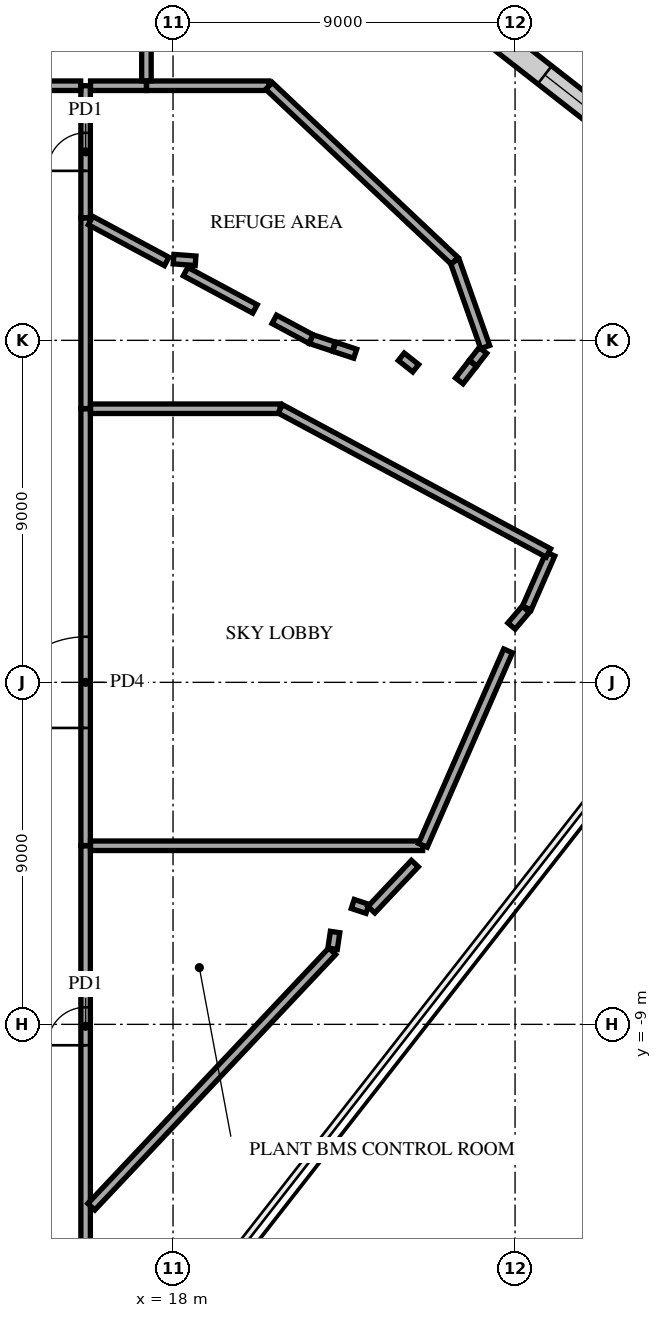
"""IFC4 building model, lengths in metres.
Left out: names, types, materials, properties, quantities, classifications, styles, units other than length and angle.
Written with IfcOpenShell. Run it as: python <this file> out.ifc"""

import sys

from ifc_helpers import new_model, si_unit, direction, frame, frame_2d, origin, place, context, subcontext, project, spatial, rectangle, extrude, element, fill, save


model = new_model("IFC4")
c1 = context("Model", 3, precision=1e-05, world=origin(), true_north=direction((0.0, 1.0)))
c2 = subcontext(c1, "Body", "Model", "MODEL_VIEW")
j1 = project(units=[si_unit("LENGTHUNIT", "METRE"), si_unit("PLANEANGLEUNIT", "RADIAN")], contexts=[c1])
p1 = place(None, origin())
s1 = spatial("IfcSite", under=j1, at=p1, CompositionType="ELEMENT")
p2 = place(p1, origin())
s2 = spatial("IfcBuilding", under=s1, at=p2, CompositionType="ELEMENT")
p3 = place(p2, frame((0.0, 0.0, 237.3)))
s3 = spatial("IfcBuildingStorey", under=s2, at=p3, CompositionType="ELEMENT", Elevation=237.3)
p4 = place(p3, frame((15.7, -15.7, 0.0), z_axis=(0.0, 0.0, 1.0), x_axis=(0.0, 1.0, 0.0)))
e1 = element("IfcWall", 1, at=p4, inside=s3, PredefinedType="PARTITIONING", context=c2, shape_type="SweptSolid", body=[
    extrude(rectangle(XDim=11.4, YDim=0.25, at=frame_2d((5.7, 0.0))), origin(), (0.0, 0.0, 1.0), 4.406),
])
p5 = place(p4, frame((6.15, 0.0, 0.0)))
e2 = element("IfcOpeningElement", 2, at=p5, cuts=e1, PredefinedType="OPENING", context=c2, shape_type="SweptSolid", body=[
    extrude(rectangle(XDim=1.0, YDim=2.1, at=frame_2d((0.5, 1.05))), frame((0.0, 0.135, 0.0), z_axis=(0.0, -1.0, 0.0), x_axis=(1.0, 0.0, 0.0)), (0.0, 0.0, 1.0), 0.27),
])
p6 = place(p3, frame((15.851, -13.8, 0.0), z_axis=(0.0, 0.0, 1.0), x_axis=(0.685913359508, 0.727683216275, 0.0)))
e3 = element("IfcWall", 3, at=p6, inside=s3, PredefinedType="PARTITIONING", context=c2, shape_type="SweptSolid", body=[
    extrude(rectangle(XDim=9.241, YDim=0.25, at=frame_2d((4.62, 0.0))), origin(), (0.0, 0.0, 1.0), 4.406),
])
p7 = place(p3, frame((22.199, -7.01, 0.0), z_axis=(0.0, 0.0, 1.0), x_axis=(0.146409547937, 0.989224061714, 0.0)))
e4 = element("IfcWall", 4, at=p7, inside=s3, PredefinedType="PARTITIONING", context=c2, shape_type="SweptSolid", body=[
    extrude(rectangle(XDim=0.445, YDim=0.25, at=frame_2d((0.223, 0.0))), origin(), (0.0, 0.0, 1.0), 5.24),
])
p8 = place(p3, frame((22.729, -5.832, 0.0), z_axis=(0.0, 0.0, 1.0), x_axis=(0.949400086722, -0.314069220607, 0.0)))
e5 = element("IfcWall", 5, at=p8, inside=s3, PredefinedType="PARTITIONING", context=c2, shape_type="SweptSolid", body=[
    extrude(rectangle(XDim=0.407, YDim=0.25, at=frame_2d((0.204, 0.0))), origin(), (0.0, 0.0, 1.0), 5.24),
])
p9 = place(p3, frame((23.219, -5.983, 0.0), z_axis=(0.0, 0.0, 1.0), x_axis=(0.685939801415, 0.727658291257, 0.0)))
e6 = element("IfcWall", 6, at=p9, inside=s3, PredefinedType="PARTITIONING", context=c2, shape_type="SweptSolid", body=[
    extrude(rectangle(XDim=1.668, YDim=0.25, at=frame_2d((0.834, 0.0))), origin(), (0.0, 0.0, 1.0), 5.24),
])
p10 = place(p3, frame((15.7, -4.295, 0.0), z_axis=(0.0, 0.0, 1.0), x_axis=(0.0, 1.0, 0.0)))
e7 = element("IfcWall", 7, at=p10, inside=s3, PredefinedType="PARTITIONING", context=c2, shape_type="SweptSolid", body=[
    extrude(rectangle(XDim=11.495, YDim=0.25, at=frame_2d((5.748, 0.0))), origin(), (0.0, 0.0, 1.0), 4.72),
])
p11 = place(p10, frame((3.095, 0.0, 0.0)))
e8 = element("IfcOpeningElement", 8, at=p11, cuts=e7, PredefinedType="OPENING", context=c2, shape_type="SweptSolid", body=[
    extrude(rectangle(XDim=2.4, YDim=2.4, at=frame_2d((1.2, 1.2))), frame((0.0, 0.135, 0.0), z_axis=(0.0, -1.0, 0.0), x_axis=(1.0, 0.0, 0.0)), (0.0, 0.0, 1.0), 0.27),
])
p12 = place(p3, frame((15.83, -4.3, 0.0), z_axis=(0.0, 0.0, 1.0), x_axis=(1.0, 0.0, 0.0)))
e9 = element("IfcWall", 9, at=p12, inside=s3, PredefinedType="PARTITIONING", context=c2, shape_type="SweptSolid", body=[
    extrude(rectangle(XDim=8.739, YDim=0.25, at=frame_2d((4.369, 0.0))), origin(), (0.0, 0.0, 1.0), 4.406),
])
p13 = place(p3, frame((24.574, -4.289, 0.0), z_axis=(0.0, 0.0, 1.0), x_axis=(0.401222280586, 0.915980721173, 0.0)))
e10 = element("IfcWall", 10, at=p13, inside=s3, PredefinedType="PARTITIONING", context=c2, shape_type="SweptSolid", body=[
    extrude(rectangle(XDim=5.587, YDim=0.25, at=frame_2d((2.793, 0.0))), origin(), (0.0, 0.0, 1.0), 5.24),
])
p14 = place(p3, frame((26.907, 1.482, 0.0), z_axis=(0.0, 0.0, 1.0), x_axis=(0.647014435149, 0.76247775096, 0.0)))
e11 = element("IfcWall", 11, at=p14, inside=s3, PredefinedType="PARTITIONING", context=c2, shape_type="SweptSolid", body=[
    extrude(rectangle(XDim=0.582, YDim=0.25, at=frame_2d((0.291, 0.0))), origin(), (0.0, 0.0, 1.0), 5.24),
])
p15 = place(p3, frame((27.309, 1.956, 0.0), z_axis=(0.0, 0.0, 1.0), x_axis=(0.401091430505, 0.916038025617, 0.0)))
e12 = element("IfcWall", 12, at=p15, inside=s3, PredefinedType="PARTITIONING", context=c2, shape_type="SweptSolid", body=[
    extrude(rectangle(XDim=1.55, YDim=0.25, at=frame_2d((0.775, 0.0))), origin(), (0.0, 0.0, 1.0), 5.24),
])
p16 = place(p3, frame((15.7, 7.205, 0.0), z_axis=(0.0, 0.0, 1.0), x_axis=(0.0, 1.0, 0.0)))
e13 = element("IfcWall", 13, at=p16, inside=s3, PredefinedType="PARTITIONING", context=c2, shape_type="SweptSolid", body=[
    extrude(rectangle(XDim=5.017, YDim=0.25, at=frame_2d((2.509, 0.0))), origin(), (0.0, 0.0, 1.0), 4.72),
])
p17 = place(p3, frame((15.83, 7.2, 0.0), z_axis=(0.0, 0.0, 1.0), x_axis=(1.0, 0.0, 0.0)))
e14 = element("IfcWall", 14, at=p17, inside=s3, PredefinedType="PARTITIONING", context=c2, shape_type="SweptSolid", body=[
    extrude(rectangle(XDim=4.988, YDim=0.25, at=frame_2d((2.494, 0.0))), origin(), (0.0, 0.0, 1.0), 5.24),
])
p18 = place(p3, frame((20.823, 7.197, 0.0), z_axis=(0.0, 0.0, 1.0), x_axis=(0.880765589634, -0.473552506188, 0.0)))
e15 = element("IfcWall", 15, at=p18, inside=s3, PredefinedType="PARTITIONING", context=c2, shape_type="SweptSolid", body=[
    extrude(rectangle(XDim=8.008, YDim=0.25, at=frame_2d((4.004, 0.0))), origin(), (0.0, 0.0, 1.0), 4.406),
])
p19 = place(p3, frame((24.006, 8.567, 0.0), z_axis=(0.0, 0.0, 1.0), x_axis=(0.783912744573, -0.620871008258, 0.0)))
e16 = element("IfcWall", 16, at=p19, inside=s3, PredefinedType="PARTITIONING", context=c2, shape_type="SweptSolid", body=[
    extrude(rectangle(XDim=0.484, YDim=0.25, at=frame_2d((0.242, 0.0))), origin(), (0.0, 0.0, 1.0), 5.24),
])
p20 = place(p3, frame((25.533, 7.933, 0.0), z_axis=(0.0, 0.0, 1.0), x_axis=(0.612689720082, 0.790323545712, 0.0)))
e17 = element("IfcWall", 17, at=p20, inside=s3, PredefinedType="PARTITIONING", context=c2, shape_type="SweptSolid", body=[
    extrude(rectangle(XDim=0.581, YDim=0.25, at=frame_2d((0.291, 0.0))), origin(), (0.0, 0.0, 1.0), 5.24),
])
p21 = place(p3, frame((22.242, 8.831, 0.0), z_axis=(0.0, 0.0, 1.0), x_axis=(0.949269442188, -0.314463870942, 0.0)))
e18 = element("IfcWall", 18, at=p21, inside=s3, PredefinedType="PARTITIONING", context=c2, shape_type="SweptSolid", body=[
    extrude(rectangle(XDim=0.582, YDim=0.25, at=frame_2d((0.291, 0.0))), origin(), (0.0, 0.0, 1.0), 5.24),
])
p22 = place(p3, frame((25.898, 8.404, 0.0), z_axis=(0.0, 0.0, 1.0), x_axis=(0.612734781525, 0.790288610262, 0.0)))
e19 = element("IfcWall", 19, at=p22, inside=s3, PredefinedType="PARTITIONING", context=c2, shape_type="SweptSolid", body=[
    extrude(rectangle(XDim=0.421, YDim=0.25, at=frame_2d((0.21, 0.0))), origin(), (0.0, 0.0, 1.0), 5.24),
])
p23 = place(p3, frame((21.634, 9.032, 0.0), z_axis=(0.0, 0.0, 1.0), x_axis=(0.949265485475, -0.314475814786, 0.0)))
e20 = element("IfcWall", 20, at=p23, inside=s3, PredefinedType="PARTITIONING", context=c2, shape_type="SweptSolid", body=[
    extrude(rectangle(XDim=0.627, YDim=0.25, at=frame_2d((0.313, 0.0))), origin(), (0.0, 0.0, 1.0), 5.24),
])
p24 = place(p3, frame((20.665, 9.553, 0.0), z_axis=(0.0, 0.0, 1.0), x_axis=(0.880842985879, -0.473408527836, 0.0)))
e21 = element("IfcWall", 21, at=p24, inside=s3, PredefinedType="PARTITIONING", context=c2, shape_type="SweptSolid", body=[
    extrude(rectangle(XDim=1.095, YDim=0.25, at=frame_2d((0.548, 0.0))), origin(), (0.0, 0.0, 1.0), 5.24),
])
p25 = place(p3, frame((18.33, 10.809, 0.0), z_axis=(0.0, 0.0, 1.0), x_axis=(0.880780830304, -0.473524158802, 0.0)))
e22 = element("IfcWall", 22, at=p25, inside=s3, PredefinedType="PARTITIONING", context=c2, shape_type="SweptSolid", body=[
    extrude(rectangle(XDim=2.074, YDim=0.25, at=frame_2d((1.037, 0.0))), origin(), (0.0, 0.0, 1.0), 4.72),
])
p26 = place(p3, frame((15.83, 12.153, 0.0), z_axis=(0.0, 0.0, 1.0), x_axis=(0.880763949792, -0.473555556135, 0.0)))
e23 = element("IfcWall", 23, at=p26, inside=s3, PredefinedType="PARTITIONING", context=c2, shape_type="SweptSolid", body=[
    extrude(rectangle(XDim=2.274, YDim=0.25, at=frame_2d((1.137, 0.0))), origin(), (0.0, 0.0, 1.0), 4.42),
])
p27 = place(p3, frame((25.413, 11.088, 0.0), z_axis=(0.0, 0.0, 1.0), x_axis=(0.333527224154, -0.942740468394, 0.0)))
e24 = element("IfcWall", 24, at=p27, inside=s3, PredefinedType="PARTITIONING", context=c2, shape_type="SweptSolid", body=[
    extrude(rectangle(XDim=2.402, YDim=0.25, at=frame_2d((1.201, 0.0))), origin(), (0.0, 0.0, 1.0), 4.42),
])
p28 = place(p3, frame((18.013, 11.137, 0.0), z_axis=(0.0, 0.0, 1.0), x_axis=(0.997234429152, -0.074320207983, 0.0)))
e25 = element("IfcWall", 25, at=p28, inside=s3, PredefinedType="PARTITIONING", context=c2, shape_type="SweptSolid", body=[
    extrude(rectangle(XDim=0.582, YDim=0.25, at=frame_2d((0.291, 0.0))), origin(), (0.0, 0.0, 1.0), 5.24),
])
p29 = place(p3, frame((15.7, 12.227, 0.0), z_axis=(0.0, 0.0, 1.0), x_axis=(0.0, 1.0, 0.0)))
e26 = element("IfcWall", 26, at=p29, inside=s3, PredefinedType="PARTITIONING", context=c2, shape_type="SweptSolid", body=[
    extrude(rectangle(XDim=3.473, YDim=0.25, at=frame_2d((1.736, 0.0))), origin(), (0.0, 0.0, 1.0), 4.72),
])
p30 = place(p29, frame((1.232, 0.0, 0.0)))
e27 = element("IfcOpeningElement", 27, at=p30, cuts=e26, PredefinedType="OPENING", context=c2, shape_type="SweptSolid", body=[
    extrude(rectangle(XDim=1.0, YDim=2.1, at=frame_2d((0.5, 1.05))), frame((0.0, 0.135, 0.0), z_axis=(0.0, -1.0, 0.0), x_axis=(1.0, 0.0, 0.0)), (0.0, 0.0, 1.0), 0.27),
])
p31 = place(p3, frame((11.723, 15.7, 0.0), z_axis=(0.0, 0.0, 1.0), x_axis=(1.0, 0.0, 0.0)))
e28 = element("IfcWall", 28, at=p31, inside=s3, PredefinedType="PARTITIONING", context=c2, shape_type="SweptSolid", body=[
    extrude(rectangle(XDim=3.847, YDim=0.25, at=frame_2d((1.923, 0.0))), origin(), (0.0, 0.0, 1.0), 4.72),
])
p32 = place(p31, frame((1.383, 0.0, 0.0)))
e29 = element("IfcOpeningElement", 29, at=p32, cuts=e28, PredefinedType="OPENING", context=c2, shape_type="SweptSolid", body=[
    extrude(rectangle(XDim=1.2, YDim=2.1, at=frame_2d((0.6, 1.05))), frame((0.0, 0.135, 0.0), z_axis=(0.0, -1.0, 0.0), x_axis=(1.0, 0.0, 0.0)), (0.0, 0.0, 1.0), 0.27),
])
p33 = place(p3, frame((15.83, 15.7, 0.0), z_axis=(0.0, 0.0, 1.0), x_axis=(1.0, 0.0, 0.0)))
e30 = element("IfcWall", 30, at=p33, inside=s3, PredefinedType="PARTITIONING", context=c2, shape_type="SweptSolid", body=[
    extrude(rectangle(XDim=1.47, YDim=0.25, at=frame_2d((0.735, 0.0))), origin(), (0.0, 0.0, 1.0), 5.24),
])
p34 = place(p3, frame((17.305, 15.7, 0.0), z_axis=(0.0, 0.0, 1.0), x_axis=(1.0, 0.0, 0.0)))
e31 = element("IfcWall", 31, at=p34, inside=s3, PredefinedType="PARTITIONING", context=c2, shape_type="SweptSolid", body=[
    extrude(rectangle(XDim=3.216, YDim=0.25, at=frame_2d((1.608, 0.0))), origin(), (0.0, 0.0, 1.0), 4.72),
])
p35 = place(p3, frame((20.525, 15.695, 0.0), z_axis=(0.0, 0.0, 1.0), x_axis=(0.727680712337, -0.685916015918, 0.0)))
e32 = element("IfcWall", 32, at=p35, inside=s3, PredefinedType="PARTITIONING", context=c2, shape_type="SweptSolid", body=[
    extrude(rectangle(XDim=6.711, YDim=0.25, at=frame_2d((3.355, 0.0))), origin(), (0.0, 0.0, 1.0), 4.72),
])
p36 = place(p3, frame((17.3, 15.83, 0.0), z_axis=(0.0, 0.0, 1.0), x_axis=(0.0, 1.0, 0.0)))
e33 = element("IfcWall", 33, at=p36, inside=s3, PredefinedType="PARTITIONING", context=c2, shape_type="SweptSolid", body=[
    extrude(rectangle(XDim=2.906, YDim=0.25, at=frame_2d((1.453, 0.0))), origin(), (0.0, 0.0, 1.0), 4.72),
])
p37 = place(p3, frame((33.651, 11.398, 0.0), z_axis=(0.0, 0.0, 1.0), x_axis=(-0.788011466291, 0.61566056313, 0.0)))
e34 = element("IfcWall", 34, at=p37, inside=s3, PredefinedType="STANDARD", context=c2, shape_type="SweptSolid", body=[
    extrude(rectangle(XDim=39.0, YDim=0.6, at=frame_2d((19.5, 0.0))), origin(), (0.0, 0.0, 1.0), 5.24),
])
p38 = place(p37, frame((1.217, 0.0, 0.6)))
e35 = element("IfcOpeningElement", 35, at=p38, cuts=e34, PredefinedType="OPENING", context=c2, shape_type="SweptSolid", body=[
    extrude(rectangle(XDim=1.9, YDim=4.19, at=frame_2d((0.95, 2.095))), frame((0.0, 0.31, 0.0), z_axis=(0.0, -1.0, 0.0), x_axis=(1.0, 0.0, 0.0)), (0.0, 0.0, 1.0), 0.62),
])
p39 = place(p37, frame((5.55, 0.0, 0.6)))
e36 = element("IfcOpeningElement", 36, at=p39, cuts=e34, PredefinedType="OPENING", context=c2, shape_type="SweptSolid", body=[
    extrude(rectangle(XDim=1.9, YDim=4.19, at=frame_2d((0.95, 2.095))), frame((0.0, 0.31, 0.0), z_axis=(0.0, -1.0, 0.0), x_axis=(1.0, 0.0, 0.0)), (0.0, 0.0, 1.0), 0.62),
])
p40 = place(p37, frame((18.55, 0.0, 0.6)))
e37 = element("IfcOpeningElement", 37, at=p40, cuts=e34, PredefinedType="OPENING", context=c2, shape_type="SweptSolid", body=[
    extrude(rectangle(XDim=1.9, YDim=4.19, at=frame_2d((0.95, 2.095))), frame((0.0, 0.31, 0.0), z_axis=(0.0, -1.0, 0.0), x_axis=(1.0, 0.0, 0.0)), (0.0, 0.0, 1.0), 0.62),
])
p41 = place(p37, frame((22.883, 0.0, 0.6)))
e38 = element("IfcOpeningElement", 38, at=p41, cuts=e34, PredefinedType="OPENING", context=c2, shape_type="SweptSolid", body=[
    extrude(rectangle(XDim=1.9, YDim=4.19, at=frame_2d((0.95, 2.095))), frame((0.0, 0.31, 0.0), z_axis=(0.0, -1.0, 0.0), x_axis=(1.0, 0.0, 0.0)), (0.0, 0.0, 1.0), 0.62),
])
p42 = place(p37, frame((31.55, 0.0, 0.6)))
e39 = element("IfcOpeningElement", 39, at=p42, cuts=e34, PredefinedType="OPENING", context=c2, shape_type="SweptSolid", body=[
    extrude(rectangle(XDim=1.9, YDim=4.19, at=frame_2d((0.95, 2.095))), frame((0.0, 0.31, 0.0), z_axis=(0.0, -1.0, 0.0), x_axis=(1.0, 0.0, 0.0)), (0.0, 0.0, 1.0), 0.62),
])
p43 = place(p37, frame((35.883, 0.0, 0.6)))
e40 = element("IfcOpeningElement", 40, at=p43, cuts=e34, PredefinedType="OPENING", context=c2, shape_type="SweptSolid", body=[
    extrude(rectangle(XDim=1.9, YDim=4.19, at=frame_2d((0.95, 2.095))), frame((0.0, 0.31, 0.0), z_axis=(0.0, -1.0, 0.0), x_axis=(1.0, 0.0, 0.0)), (0.0, 0.0, 1.0), 0.62),
])
p44 = place(p30, origin())
e41 = element("IfcDoor", 41, at=p44, inside=s3, OperationType="SINGLE_SWING_LEFT", PredefinedType="DOOR", context=c2, shape_type="SweptSolid", body=[
    extrude(rectangle(XDim=1.0, YDim=2.1, at=frame_2d((0.5, 1.05))), frame((0.0, 0.025, 0.0), z_axis=(0.0, -1.0, 0.0), x_axis=(1.0, 0.0, 0.0)), (0.0, 0.0, 1.0), 0.05),
])
fill(e27, e41)
p45 = place(p11, origin())
e42 = element("IfcDoor", 42, at=p45, inside=s3, OperationType="SINGLE_SWING_LEFT", PredefinedType="DOOR", context=c2, shape_type="SweptSolid", body=[
    extrude(rectangle(XDim=2.4, YDim=2.4, at=frame_2d((1.2, 1.2))), frame((0.0, 0.025, 0.0), z_axis=(0.0, -1.0, 0.0), x_axis=(1.0, 0.0, 0.0)), (0.0, 0.0, 1.0), 0.05),
])
fill(e8, e42)
p46 = place(p5, origin())
e43 = element("IfcDoor", 43, at=p46, inside=s3, OperationType="SINGLE_SWING_LEFT", PredefinedType="DOOR", context=c2, shape_type="SweptSolid", body=[
    extrude(rectangle(XDim=1.0, YDim=2.1, at=frame_2d((0.5, 1.05))), frame((0.0, 0.025, 0.0), z_axis=(0.0, -1.0, 0.0), x_axis=(1.0, 0.0, 0.0)), (0.0, 0.0, 1.0), 0.05),
])
fill(e2, e43)
p47 = place(p39, origin())
e44 = element("IfcWindow", 44, at=p47, inside=s3, PartitioningType="SINGLE_PANEL", PredefinedType="USERDEFINED", context=c2, shape_type="SweptSolid", body=[
    extrude(rectangle(XDim=1.9, YDim=4.19, at=frame_2d((0.95, 2.095))), frame((0.0, 0.03, 0.0), z_axis=(0.0, -1.0, 0.0), x_axis=(1.0, 0.0, 0.0)), (0.0, 0.0, 1.0), 0.06),
])
fill(e36, e44)
save(model, sys.argv[1])
